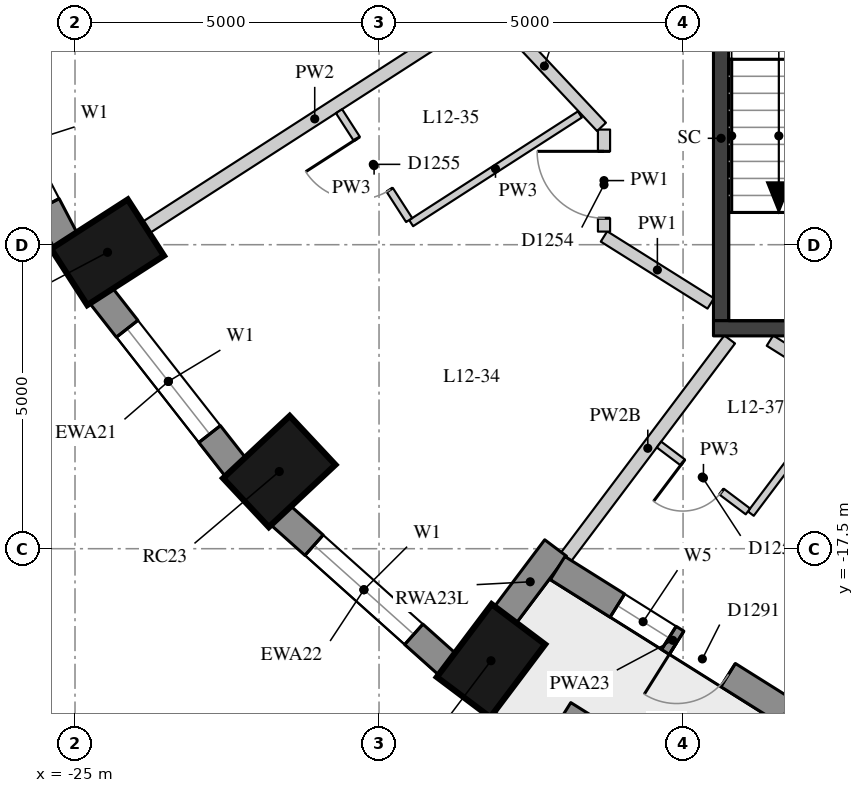
"""IFC4 building model, lengths in metres.
Left out: names, types, materials, properties, quantities, classifications, styles, units other than length and angle.
Written with IfcOpenShell. Run it as: python <this file> out.ifc"""

import sys

from ifc_helpers import new_model, si_unit, direction, frame, frame_2d, origin, origin_2d, place, context, subcontext, project, spatial, rectangle, extrude, element, fill, save


model = new_model("IFC4")
c1 = context("Model", 3, precision=1e-05, world=origin(), true_north=direction((0.0, 1.0)))
c2 = subcontext(c1, "Body", "Model", "MODEL_VIEW")
j1 = project(units=[si_unit("LENGTHUNIT", "METRE"), si_unit("PLANEANGLEUNIT", "RADIAN")], contexts=[c1])
p1 = place(None, origin())
s1 = spatial("IfcSite", under=j1, at=p1, CompositionType="ELEMENT")
p2 = place(p1, origin())
s2 = spatial("IfcBuilding", under=s1, at=p2, CompositionType="ELEMENT")
p3 = place(p2, frame((0.0, 0.0, 48.1)))
s3 = spatial("IfcBuildingStorey", under=s2, at=p3, CompositionType="ELEMENT", Elevation=48.1)
for number, where, z_axis, x_axis in (
    (1, (-24.465, -12.625, 0.0), (0.0, 0.0, 1.0), (-0.841, -0.541, 0.0)),
    (2, (-21.641, -16.23, 0.0), (0.0, 0.0, 1.0), (-0.73, -0.683, 0.0)),
    (3, (-18.159, -19.343, 0.0), (0.0, 0.0, 1.0), (-0.601, -0.799, 0.0)),
):
    element("IfcColumn", number, at=place(p3, frame(where, z_axis=z_axis, x_axis=x_axis)), inside=s3, PredefinedType="COLUMN", context=c2, shape_type="SweptSolid", body=[
        extrude(rectangle(XDim=1.5, YDim=1.1, at=origin_2d()), origin(), (0.0, 0.0, 1.0), 3.3),
    ])
p4 = place(p3, frame((-26.786, -9.305, 0.0), z_axis=(0.0, 0.0, 1.0), x_axis=(0.462492775226, -0.886623050041, 0.0)))
e4 = element("IfcWall", 4, at=p4, inside=s3, PredefinedType="SOLIDWALL", context=c2, shape_type="SweptSolid", body=[
    extrude(rectangle(XDim=3.532, YDim=0.45, at=frame_2d((1.766, 0.0))), origin(), (0.0, 0.0, 1.0), 3.02),
])
p5 = place(p4, frame((0.666, 0.0, 0.4)))
e5 = element("IfcOpeningElement", 5, at=p5, cuts=e4, PredefinedType="OPENING", context=c2, shape_type="SweptSolid", body=[
    extrude(rectangle(XDim=2.2, YDim=1.75, at=frame_2d((1.1, 0.875))), frame((0.0, 0.235, 0.0), z_axis=(0.0, -1.0, 0.0), x_axis=(1.0, 0.0, 0.0)), (0.0, 0.0, 1.0), 0.47),
])
p6 = place(p3, frame((-24.578, -13.328, 0.0), z_axis=(0.0, 0.0, 1.0), x_axis=(0.616661975264, -0.787228053529, 0.0)))
e6 = element("IfcWall", 6, at=p6, inside=s3, PredefinedType="SOLIDWALL", context=c2, shape_type="SweptSolid", body=[
    extrude(rectangle(XDim=3.61, YDim=0.45, at=frame_2d((1.805, 0.0))), origin(), (0.0, 0.0, 1.0), 3.02),
])
p7 = place(p6, frame((0.705, 0.0, 0.4)))
e7 = element("IfcOpeningElement", 7, at=p7, cuts=e6, PredefinedType="OPENING", context=c2, shape_type="SweptSolid", body=[
    extrude(rectangle(XDim=2.2, YDim=1.75, at=frame_2d((1.1, 0.875))), frame((0.0, 0.235, 0.0), z_axis=(0.0, -1.0, 0.0), x_axis=(1.0, 0.0, 0.0)), (0.0, 0.0, 1.0), 0.47),
])
p8 = place(p3, frame((-21.627, -16.943, 0.0), z_axis=(0.0, 0.0, 1.0), x_axis=(0.745526233716, -0.66647628228, 0.0)))
e8 = element("IfcWall", 8, at=p8, inside=s3, PredefinedType="SOLIDWALL", context=c2, shape_type="SweptSolid", body=[
    extrude(rectangle(XDim=3.697, YDim=0.45, at=frame_2d((1.848, 0.0))), origin(), (0.0, 0.0, 1.0), 3.02),
])
p9 = place(p8, frame((0.749, 0.0, 0.4)))
e9 = element("IfcOpeningElement", 9, at=p9, cuts=e8, PredefinedType="OPENING", context=c2, shape_type="SweptSolid", body=[
    extrude(rectangle(XDim=2.2, YDim=1.75, at=frame_2d((1.1, 0.875))), frame((0.0, 0.235, 0.0), z_axis=(0.0, -1.0, 0.0), x_axis=(1.0, 0.0, 0.0)), (0.0, 0.0, 1.0), 0.47),
])
p10 = place(p3, frame((-17.932, -18.6, 0.0), z_axis=(0.0, 0.0, 1.0), x_axis=(0.601262851241, 0.799051302306, 0.0)))
e10 = element("IfcWall", 10, at=p10, inside=s3, PredefinedType="SOLIDWALL", context=c2, shape_type="SweptSolid", body=[
    extrude(rectangle(XDim=1.391, YDim=0.45, at=frame_2d((0.696, 0.0))), origin(), (0.0, 0.0, 1.0), 2.57),
])
p11 = place(p3, frame((-17.062, -17.819, 0.0), z_axis=(0.0, 0.0, 1.0), x_axis=(0.846990101364, -0.531608660757, 0.0)))
e11 = element("IfcWall", 11, at=p11, inside=s3, PredefinedType="SOLIDWALL", context=c2, shape_type="SweptSolid", body=[
    extrude(rectangle(XDim=4.469, YDim=0.45, at=frame_2d((2.234, 0.0))), origin(), (0.0, 0.0, 1.0), 3.02),
])
p12 = place(p11, frame((1.159, 0.0, 0.4)))
e12 = element("IfcOpeningElement", 12, at=p12, cuts=e11, PredefinedType="OPENING", context=c2, shape_type="SweptSolid", body=[
    extrude(rectangle(XDim=1.0, YDim=1.75, at=frame_2d((0.5, 0.875))), frame((0.0, 0.235, 0.0), z_axis=(0.0, -1.0, 0.0), x_axis=(1.0, 0.0, 0.0)), (0.0, 0.0, 1.0), 0.47),
])
p13 = place(p11, frame((2.31, 0.0, 0.0)))
e13 = element("IfcOpeningElement", 13, at=p13, cuts=e11, PredefinedType="OPENING", context=c2, shape_type="SweptSolid", body=[
    extrude(rectangle(XDim=1.0, YDim=2.15, at=frame_2d((0.5, 1.075))), frame((0.0, 0.235, 0.0), z_axis=(0.0, -1.0, 0.0), x_axis=(1.0, 0.0, 0.0)), (0.0, 0.0, 1.0), 0.47),
])
p14 = place(p3, frame((-13.31, -20.178, 0.0), z_axis=(0.0, 0.0, 1.0), x_axis=(0.922634412489, -0.385675693935, 0.0)))
e14 = element("IfcWall", 14, at=p14, inside=s3, PredefinedType="SOLIDWALL", context=c2, shape_type="SweptSolid", body=[
    extrude(rectangle(XDim=4.577, YDim=0.45, at=frame_2d((2.288, 0.0))), origin(), (0.0, 0.0, 1.0), 3.02),
])
p15 = place(p14, frame((1.213, 0.0, 0.4)))
e15 = element("IfcOpeningElement", 15, at=p15, cuts=e14, PredefinedType="OPENING", context=c2, shape_type="SweptSolid", body=[
    extrude(rectangle(XDim=1.0, YDim=1.75, at=frame_2d((0.5, 0.875))), frame((0.0, 0.235, 0.0), z_axis=(0.0, -1.0, 0.0), x_axis=(1.0, 0.0, 0.0)), (0.0, 0.0, 1.0), 0.47),
])
p16 = place(p14, frame((2.363, 0.0, 0.0)))
e16 = element("IfcOpeningElement", 16, at=p16, cuts=e14, PredefinedType="OPENING", context=c2, shape_type="SweptSolid", body=[
    extrude(rectangle(XDim=1.0, YDim=2.15, at=frame_2d((0.5, 1.075))), frame((0.0, 0.235, 0.0), z_axis=(0.0, -1.0, 0.0), x_axis=(1.0, 0.0, 0.0)), (0.0, 0.0, 1.0), 0.47),
])
p17 = place(p3, frame((-17.032, -20.328, 0.0), z_axis=(0.0, 0.0, 1.0), x_axis=(0.847609446823, -0.530620604252, 0.0)))
e17 = element("IfcWall", 17, at=p17, inside=s3, PredefinedType="USERDEFINED", context=c2, shape_type="SweptSolid", body=[
    extrude(rectangle(XDim=1.8, YDim=0.7, at=frame_2d((0.9, 0.0))), origin(), (0.0, 0.0, 1.0), 0.75),
])
p18 = place(p3, frame((-14.375, -13.75, -0.28), z_axis=(0.0, 0.0, 1.0), x_axis=(0.0, 1.0, 0.0)))
e18 = element("IfcWall", 18, at=p18, inside=s3, PredefinedType="SHEAR", context=c2, shape_type="SweptSolid", body=[
    extrude(rectangle(XDim=6.0, YDim=0.25, at=frame_2d((3.0, 0.0))), origin(), (0.0, 0.0, 1.0), 3.3),
])
p19 = place(p3, frame((-14.5, -13.875, -0.28), z_axis=(0.0, 0.0, 1.0), x_axis=(1.0, 0.0, 0.0)))
e19 = element("IfcWall", 19, at=p19, inside=s3, PredefinedType="SHEAR", context=c2, shape_type="SweptSolid", body=[
    extrude(rectangle(XDim=5.2, YDim=0.25, at=frame_2d((2.6, 0.0))), origin(), (0.0, 0.0, 1.0), 3.3),
])
p20 = place(p3, frame((-14.545, -13.466, 0.0), z_axis=(0.0, 0.0, 1.0), x_axis=(-0.846977572949, 0.53162862124, 0.0)))
e20 = element("IfcWall", 20, at=p20, inside=s3, PredefinedType="PARTITIONING", context=c2, shape_type="SweptSolid", body=[
    extrude(rectangle(XDim=2.073, YDim=0.2, at=frame_2d((1.036, 0.0))), origin(), (0.0, 0.0, 1.0), 3.02),
])
p21 = place(p3, frame((-16.3, -12.284, 0.0), z_axis=(0.0, 0.0, 1.0), x_axis=(0.0, 1.0, 0.0)))
e21 = element("IfcWall", 21, at=p21, inside=s3, PredefinedType="PARTITIONING", context=c2, shape_type="SweptSolid", body=[
    extrude(rectangle(XDim=1.678, YDim=0.2, at=frame_2d((0.839, 0.0))), origin(), (0.0, 0.0, 1.0), 3.02),
])
p22 = place(p21, frame((0.22, 0.0, 0.0)))
e22 = element("IfcOpeningElement", 22, at=p22, cuts=e21, PredefinedType="OPENING", context=c2, shape_type="SweptSolid", body=[
    extrude(rectangle(XDim=1.1, YDim=2.1, at=frame_2d((0.55, 1.05))), frame((0.0, 0.11, 0.0), z_axis=(0.0, -1.0, 0.0), x_axis=(1.0, 0.0, 0.0)), (0.0, 0.0, 1.0), 0.22),
])
p23 = place(p3, frame((-16.341, -10.562, 0.0), z_axis=(0.0, 0.0, 1.0), x_axis=(-0.684393472021, 0.729112868803, 0.0)))
e23 = element("IfcWall", 23, at=p23, inside=s3, PredefinedType="PARTITIONING", context=c2, shape_type="SweptSolid", body=[
    extrude(rectangle(XDim=2.746, YDim=0.2, at=frame_2d((1.373, 0.0))), origin(), (0.0, 0.0, 1.0), 3.02),
])
p24 = place(p3, frame((-10.972, -15.708, 0.0), z_axis=(0.0, 0.0, 1.0), x_axis=(-0.846954991261, 0.53166459613, 0.0)))
e24 = element("IfcWall", 24, at=p24, inside=s3, PredefinedType="PARTITIONING", context=c2, shape_type="SweptSolid", body=[
    extrude(rectangle(XDim=3.068, YDim=0.2, at=frame_2d((1.534, 0.0))), origin(), (0.0, 0.0, 1.0), 3.02),
])
p25 = place(p3, frame((-23.835, -12.219, 0.0), z_axis=(0.0, 0.0, 1.0), x_axis=(0.840757959101, 0.541411169268, 0.0)))
e25 = element("IfcWall", 25, at=p25, inside=s3, PredefinedType="PARTITIONING", context=c2, shape_type="SweptSolid", body=[
    extrude(rectangle(XDim=6.606, YDim=0.22, at=frame_2d((3.303, 0.0))), origin(), (0.0, 0.0, 1.0), 3.02),
])
p26 = place(p3, frame((-16.927, -17.638, 0.0), z_axis=(0.0, 0.0, 1.0), x_axis=(0.601158965663, 0.799129462605, 0.0)))
e26 = element("IfcWall", 26, at=p26, inside=s3, PredefinedType="PARTITIONING", context=c2, shape_type="SweptSolid", body=[
    extrude(rectangle(XDim=4.48, YDim=0.22, at=frame_2d((2.24, 0.0))), origin(), (0.0, 0.0, 1.0), 2.57),
])
p27 = place(p3, frame((-16.697, -10.358, 0.0), z_axis=(0.0, 0.0, 1.0), x_axis=(-0.84073116979, -0.541452768156, 0.0)))
e27 = element("IfcWall", 27, at=p27, inside=s3, PredefinedType="PARTITIONING", context=c2, shape_type="SweptSolid", body=[
    extrude(rectangle(XDim=3.301, YDim=0.12, at=frame_2d((1.65, 0.0))), origin(), (0.0, 0.0, 1.0), 3.02),
])
p28 = place(p3, frame((-12.391, -14.936, 0.0), z_axis=(0.0, 0.0, 1.0), x_axis=(-0.601209195786, -0.799091673654, 0.0)))
e28 = element("IfcWall", 28, at=p28, inside=s3, PredefinedType="PARTITIONING", context=c2, shape_type="SweptSolid", body=[
    extrude(rectangle(XDim=2.486, YDim=0.12, at=frame_2d((1.243, 0.0))), origin(), (0.0, 0.0, 1.0), 3.02),
])
p29 = place(p3, frame((-19.504, -12.095, 0.0), z_axis=(0.0, 0.0, 1.0), x_axis=(-0.541591545821, 0.840641777153, 0.0)))
e29 = element("IfcWall", 29, at=p29, inside=s3, PredefinedType="PARTITIONING", context=c2, shape_type="SweptSolid", body=[
    extrude(rectangle(XDim=2.13, YDim=0.12, at=frame_2d((1.065, 0.0))), origin(), (0.0, 0.0, 1.0), 3.02),
])
p30 = place(p29, frame((0.59, 0.0, 0.0)))
e30 = element("IfcOpeningElement", 30, at=p30, cuts=e29, PredefinedType="OPENING", context=c2, shape_type="SweptSolid", body=[
    extrude(rectangle(XDim=1.0, YDim=2.1, at=frame_2d((0.5, 1.05))), frame((0.0, 0.07, 0.0), z_axis=(0.0, -1.0, 0.0), x_axis=(1.0, 0.0, 0.0)), (0.0, 0.0, 1.0), 0.14),
])
p31 = place(p3, frame((-13.933, -16.887, 0.0), z_axis=(0.0, 0.0, 1.0), x_axis=(-0.799134663307, 0.601152052231, 0.0)))
e31 = element("IfcWall", 31, at=p31, inside=s3, PredefinedType="PARTITIONING", context=c2, shape_type="SweptSolid", body=[
    extrude(rectangle(XDim=1.83, YDim=0.12, at=frame_2d((0.915, 0.0))), origin(), (0.0, 0.0, 1.0), 3.02),
])
p32 = place(p31, frame((0.54, 0.0, 0.0)))
e32 = element("IfcOpeningElement", 32, at=p32, cuts=e31, PredefinedType="OPENING", context=c2, shape_type="SweptSolid", body=[
    extrude(rectangle(XDim=0.8, YDim=2.1, at=frame_2d((0.4, 1.05))), frame((0.0, 0.07, 0.0), z_axis=(0.0, -1.0, 0.0), x_axis=(1.0, 0.0, 0.0)), (0.0, 0.0, 1.0), 0.14),
])
p33 = place(p7, origin())
e33 = element("IfcWindow", 33, at=p33, inside=s3, PartitioningType="SINGLE_PANEL", PredefinedType="WINDOW", context=c2, shape_type="SweptSolid", body=[
    extrude(rectangle(XDim=2.2, YDim=1.75, at=frame_2d((1.1, 0.875))), frame((0.0, 0.035, 0.0), z_axis=(0.0, -1.0, 0.0), x_axis=(1.0, 0.0, 0.0)), (0.0, 0.0, 1.0), 0.06),
])
fill(e7, e33)
p34 = place(p9, origin())
e34 = element("IfcWindow", 34, at=p34, inside=s3, PartitioningType="SINGLE_PANEL", PredefinedType="WINDOW", context=c2, shape_type="SweptSolid", body=[
    extrude(rectangle(XDim=2.2, YDim=1.75, at=frame_2d((1.1, 0.875))), frame((0.0, 0.035, 0.0), z_axis=(0.0, -1.0, 0.0), x_axis=(1.0, 0.0, 0.0)), (0.0, 0.0, 1.0), 0.06),
])
fill(e9, e34)
p35 = place(p12, origin())
e35 = element("IfcWindow", 35, at=p35, inside=s3, PartitioningType="SINGLE_PANEL", PredefinedType="WINDOW", context=c2, shape_type="SweptSolid", body=[
    extrude(rectangle(XDim=1.0, YDim=1.75, at=frame_2d((0.5, 0.875))), frame((0.0, 0.035, 0.0), z_axis=(0.0, -1.0, 0.0), x_axis=(1.0, 0.0, 0.0)), (0.0, 0.0, 1.0), 0.06),
])
fill(e12, e35)
p36 = place(p13, frame((1.0, 0.0, 0.0), z_axis=(0.0, 0.0, 1.0), x_axis=(-1.0, 0.0, 0.0)))
e36 = element("IfcDoor", 36, at=p36, inside=s3, OperationType="SINGLE_SWING_RIGHT", PredefinedType="DOOR", context=c2, shape_type="SweptSolid", body=[
    extrude(rectangle(XDim=1.0, YDim=2.15, at=frame_2d((0.5, 1.075))), frame((0.0, 0.075, 0.0), z_axis=(0.0, -1.0, 0.0), x_axis=(1.0, 0.0, 0.0)), (0.0, 0.0, 1.0), 0.05),
])
fill(e13, e36)
p37 = place(p22, origin())
e37 = element("IfcDoor", 37, at=p37, inside=s3, OperationType="SINGLE_SWING_RIGHT", PredefinedType="DOOR", context=c2, shape_type="SweptSolid", body=[
    extrude(rectangle(XDim=1.1, YDim=2.1, at=frame_2d((0.55, 1.05))), frame((0.0, 0.025, 0.0), z_axis=(0.0, -1.0, 0.0), x_axis=(1.0, 0.0, 0.0)), (0.0, 0.0, 1.0), 0.05),
])
fill(e22, e37)
p38 = place(p30, origin())
e38 = element("IfcDoor", 38, at=p38, inside=s3, OperationType="SINGLE_SWING_RIGHT", PredefinedType="DOOR", context=c2, shape_type="SweptSolid", body=[
    extrude(rectangle(XDim=1.0, YDim=2.1, at=frame_2d((0.5, 1.05))), frame((0.0, 0.025, 0.0), z_axis=(0.0, -1.0, 0.0), x_axis=(1.0, 0.0, 0.0)), (0.0, 0.0, 1.0), 0.05),
])
fill(e30, e38)
p39 = place(p32, origin())
e39 = element("IfcDoor", 39, at=p39, inside=s3, OperationType="SINGLE_SWING_RIGHT", PredefinedType="DOOR", context=c2, shape_type="SweptSolid", body=[
    extrude(rectangle(XDim=0.8, YDim=2.1, at=frame_2d((0.4, 1.05))), frame((0.0, 0.025, 0.0), z_axis=(0.0, -1.0, 0.0), x_axis=(1.0, 0.0, 0.0)), (0.0, 0.0, 1.0), 0.05),
])
fill(e32, e39)
save(model, sys.argv[1])
